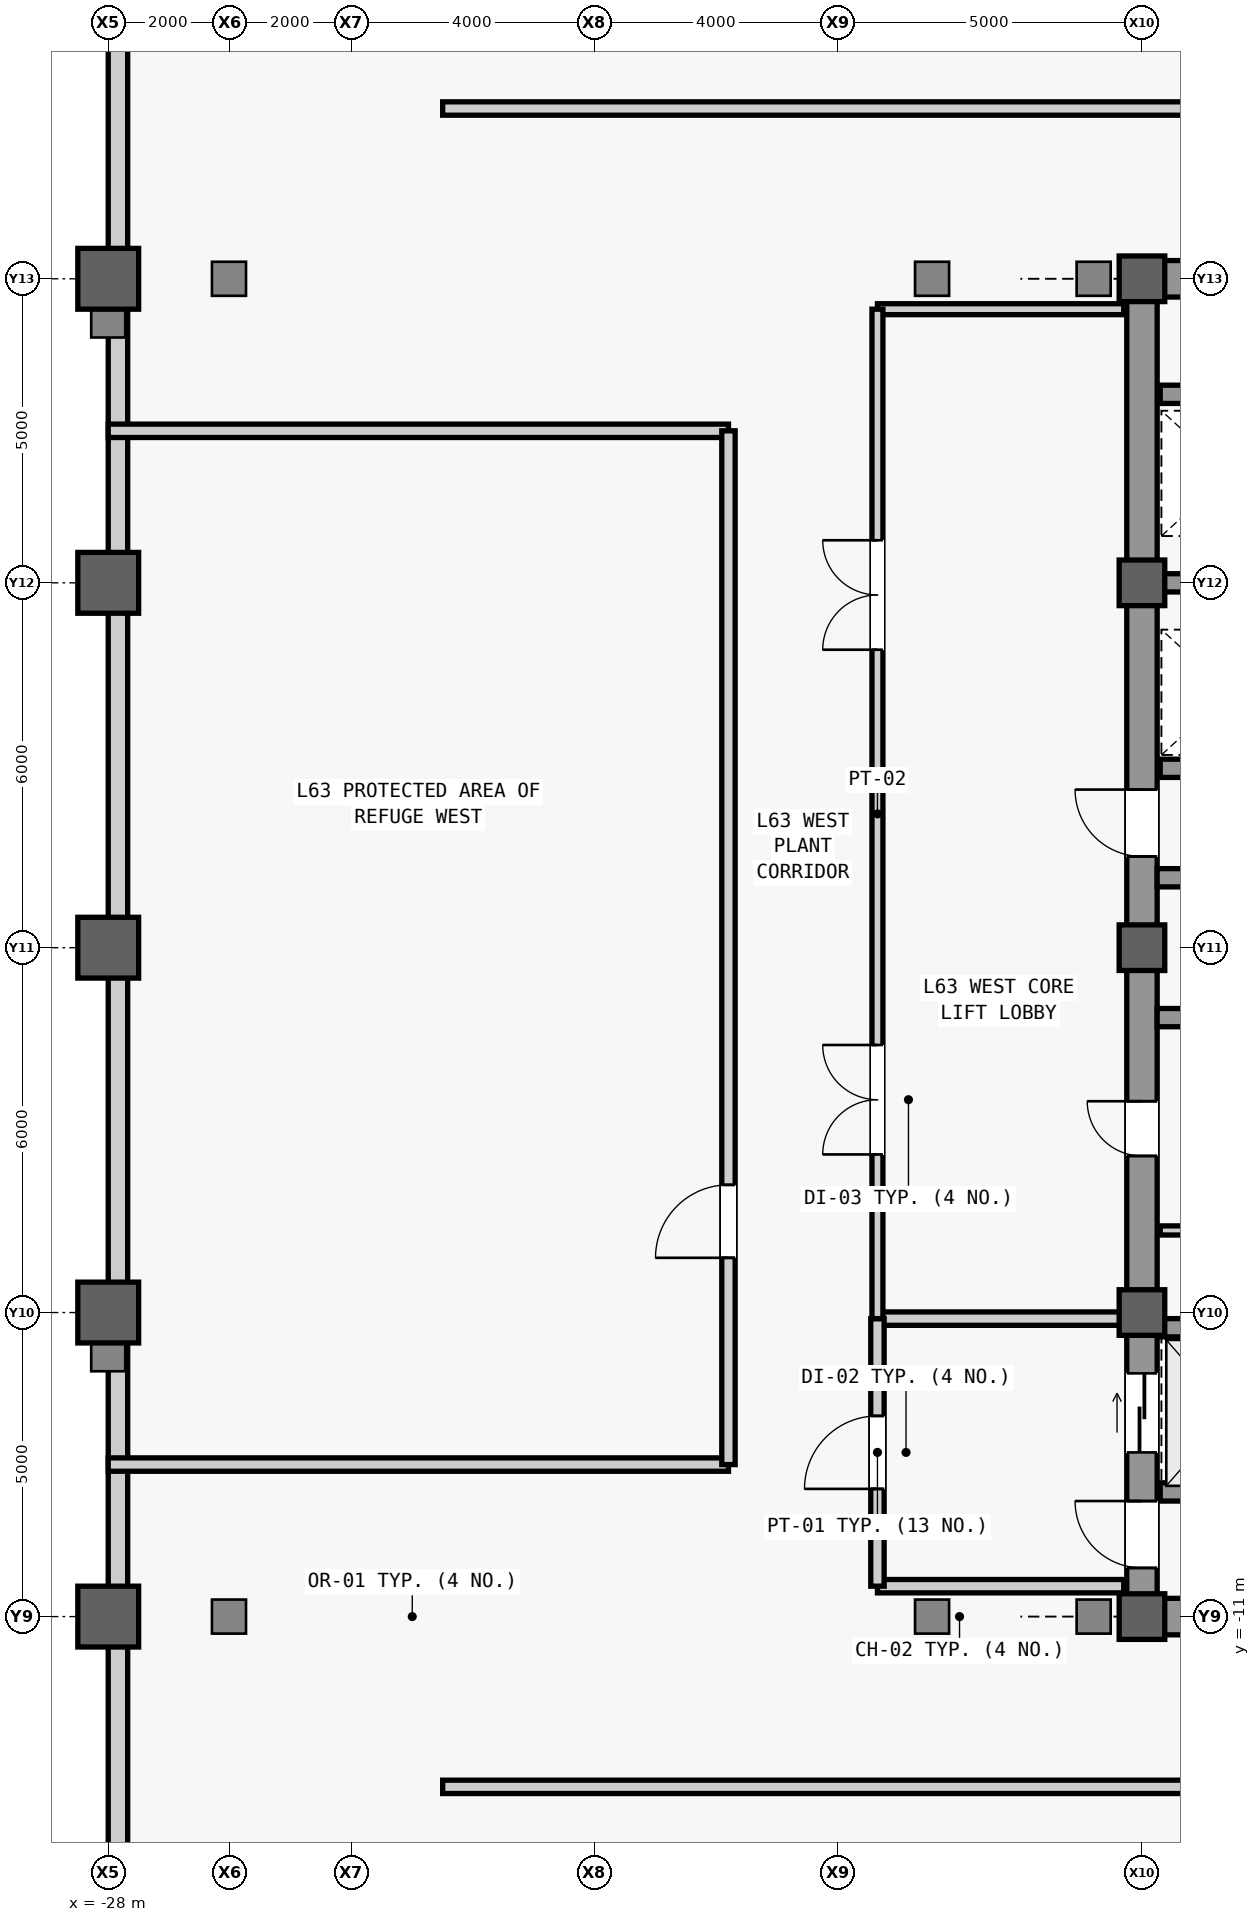
"""IFC4 building model, lengths in metres.
Left out: names, types, materials, properties, quantities, classifications, styles, units other than length and angle.
Written with IfcOpenShell. Run it as: python <this file> out.ifc"""

import sys

from ifc_helpers import new_model, si_unit, direction, frame, frame_2d, origin, origin_2d, place, context, subcontext, project, spatial, rectangle, hollow_rectangle, extrude, source, transform, mapped, element, fill, save


model = new_model("IFC4")
c1 = context("Model", 3, precision=1e-05, world=origin(), true_north=direction((0.0, 1.0)))
c2 = subcontext(c1, "Body", "Model", "MODEL_VIEW")
j1 = project(units=[si_unit("LENGTHUNIT", "METRE"), si_unit("PLANEANGLEUNIT", "RADIAN")], contexts=[c1])
p1 = place(None, origin())
s1 = spatial("IfcSite", under=j1, at=p1, CompositionType="ELEMENT")
p2 = place(p1, origin())
s2 = spatial("IfcBuilding", under=s1, at=p2, CompositionType="ELEMENT")
p3 = place(p2, frame((0.0, 0.0, 268.3)))
s3 = spatial("IfcBuildingStorey", under=s2, at=p3, CompositionType="ELEMENT", Elevation=268.3)
m1 = source(origin(), c2, "Body", "SweptSolid", [
    extrude(rectangle(XDim=22.0, YDim=0.5, at=frame_2d((11.0, 0.0))), origin(), (0.0, 0.0, 1.0), 4.98),
])
p4 = place(p3, frame((-11.0, -11.0, 0.0), z_axis=(0.0, 0.0, 1.0), x_axis=(0.0, 1.0, 0.0)))
e1 = element("IfcWall", 1, at=p4, inside=s3, PredefinedType="SHEAR", context=c2, shape_type="MappedRepresentation", body=[
    mapped(m1, transform((0.0, 0.0, 0.0), scale=1.0)),
])
m2 = source(origin(), c2, "Body", "SweptSolid", [
    extrude(rectangle(XDim=1.1, YDim=2.2, at=frame_2d((0.55, 1.1))), frame((0.0, 0.26, 0.0), z_axis=(0.0, -1.0, 0.0), x_axis=(1.0, 0.0, 0.0)), (0.0, 0.0, 1.0), 0.52),
])
p5 = place(p4, frame((0.8, 0.0, 0.0)))
e2 = element("IfcOpeningElement", 2, at=p5, cuts=e1, PredefinedType="OPENING", context=c2, shape_type="MappedRepresentation", body=[
    mapped(m2, transform((0.0, 0.0, 0.0), scale=1.0)),
])
p6 = place(p4, frame((12.5, 0.0, 0.0)))
e3 = element("IfcOpeningElement", 3, at=p6, cuts=e1, PredefinedType="OPENING", context=c2, shape_type="MappedRepresentation", body=[
    mapped(m2, transform((0.0, 0.0, 0.0), scale=1.0)),
])
m3 = source(origin(), c2, "Body", "SweptSolid", [
    extrude(rectangle(XDim=0.9, YDim=2.15, at=frame_2d((0.45, 1.075))), frame((0.0, 0.26, 0.0), z_axis=(0.0, -1.0, 0.0), x_axis=(1.0, 0.0, 0.0)), (0.0, 0.0, 1.0), 0.52),
])
p7 = place(p4, frame((7.575, 0.0, 0.0)))
e4 = element("IfcOpeningElement", 4, at=p7, cuts=e1, PredefinedType="OPENING", context=c2, shape_type="MappedRepresentation", body=[
    mapped(m3, transform((0.0, 0.0, 0.0), scale=1.0)),
])
m4 = source(origin(), c2, "Body", "SweptSolid", [
    extrude(rectangle(XDim=1.3, YDim=2.3, at=frame_2d((0.65, 1.15))), frame((0.0, 0.26, 0.0), z_axis=(0.0, -1.0, 0.0), x_axis=(1.0, 0.0, 0.0)), (0.0, 0.0, 1.0), 0.52),
])
p8 = place(p4, frame((2.7, 0.0, 0.0)))
e5 = element("IfcOpeningElement", 5, at=p8, cuts=e1, PredefinedType="OPENING", context=c2, shape_type="MappedRepresentation", body=[
    mapped(m4, transform((0.0, 0.0, 0.0), scale=1.0)),
])
m5 = source(origin(), c2, "Body", "SweptSolid", [
    extrude(rectangle(XDim=5.9, YDim=0.6, at=frame_2d((2.95, 0.0))), origin(), (0.0, 0.0, 1.0), 4.98),
])
for number, where, z_axis, x_axis in (
    (6, (-10.75, -11.0, 0.0), (0.0, 0.0, 1.0), (1.0, 0.0, 0.0)),
    (7, (-10.75, 11.0, 0.0), (0.0, 0.0, 1.0), (1.0, 0.0, 0.0)),
):
    element("IfcWall", number, at=place(p3, frame(where, z_axis=z_axis, x_axis=x_axis)), inside=s3, PredefinedType="SHEAR", context=c2, shape_type="MappedRepresentation", body=[
        mapped(m5, transform((0.0, 0.0, 0.0), scale=1.0)),
    ])
m6 = source(origin(), c2, "Body", "SweptSolid", [
    extrude(rectangle(XDim=5.65, YDim=0.3, at=frame_2d((2.825, 0.0))), origin(), (0.0, 0.0, 1.0), 4.98),
])
for number, where, z_axis, x_axis in (
    (8, (-10.75, -1.15, 0.0), (0.0, 0.0, 1.0), (1.0, 0.0, 0.0)),
    (9, (-10.75, 1.15, 0.0), (0.0, 0.0, 1.0), (1.0, 0.0, 0.0)),
):
    element("IfcWall", number, at=place(p3, frame(where, z_axis=z_axis, x_axis=x_axis)), inside=s3, PredefinedType="SHEAR", context=c2, shape_type="MappedRepresentation", body=[
        mapped(m6, transform((0.0, 0.0, 0.0), scale=1.0)),
    ])
m7 = source(origin(), c2, "Body", "SweptSolid", [
    extrude(hollow_rectangle(XDim=1.0, YDim=1.0, WallThickness=0.055, at=origin_2d()), origin(), (0.0, 0.0, 1.0), 5.2),
])
for number, where, z_axis, x_axis in (
    (10, (-28.0, -11.0, 0.0), (0.0, 0.0, 1.0), (1.0, 0.0, 0.0)),
    (11, (-28.0, -6.0, 0.0), (0.0, 0.0, 1.0), (1.0, 0.0, 0.0)),
    (12, (-28.0, 0.0, 0.0), (0.0, 0.0, 1.0), (1.0, 0.0, 0.0)),
    (13, (-28.0, 6.0, 0.0), (0.0, 0.0, 1.0), (1.0, 0.0, 0.0)),
    (14, (-28.0, 11.0, 0.0), (0.0, 0.0, 1.0), (1.0, 0.0, 0.0)),
):
    element("IfcColumn", number, at=place(p3, frame(where, z_axis=z_axis, x_axis=x_axis)), inside=s3, PredefinedType="COLUMN", context=c2, shape_type="MappedRepresentation", body=[
        mapped(m7, transform((0.0, 0.0, 0.0), scale=1.0)),
    ])
m8 = source(origin(), c2, "Body", "SweptSolid", [
    extrude(rectangle(XDim=0.75, YDim=0.75, at=origin_2d()), origin(), (0.0, 0.0, 1.0), 5.2),
])
for number, where, z_axis, x_axis in (
    (15, (-11.0, -11.0, 0.0), (0.0, 0.0, 1.0), (1.0, 0.0, 0.0)),
    (16, (-11.0, -6.0, 0.0), (0.0, 0.0, 1.0), (1.0, 0.0, 0.0)),
    (17, (-11.0, 0.0, 0.0), (0.0, 0.0, 1.0), (1.0, 0.0, 0.0)),
    (18, (-11.0, 6.0, 0.0), (0.0, 0.0, 1.0), (1.0, 0.0, 0.0)),
    (19, (-11.0, 11.0, 0.0), (0.0, 0.0, 1.0), (1.0, 0.0, 0.0)),
):
    element("IfcColumn", number, at=place(p3, frame(where, z_axis=z_axis, x_axis=x_axis)), inside=s3, PredefinedType="COLUMN", context=c2, shape_type="MappedRepresentation", body=[
        mapped(m8, transform((0.0, 0.0, 0.0), scale=1.0)),
    ])
m9 = source(origin(), c2, "Body", "SweptSolid", [
    extrude(rectangle(XDim=45.0, YDim=0.32, at=frame_2d((22.5, 0.0))), origin(), (0.0, 0.0, 1.0), 4.364),
])
p9 = place(p3, frame((-27.84, -22.5, 0.0), z_axis=(0.0, 0.0, 1.0), x_axis=(0.0, 1.0, 0.0)))
e20 = element("IfcWall", 20, at=p9, inside=s3, PredefinedType="STANDARD", context=c2, shape_type="MappedRepresentation", body=[
    mapped(m9, transform((0.0, 0.0, 0.0), scale=1.0)),
])
m10 = source(origin(), c2, "Body", "SweptSolid", [
    extrude(rectangle(XDim=2.2, YDim=0.3, at=frame_2d((1.1, 0.0))), origin(), (0.0, 0.0, 1.0), 4.98),
])
for number, where, z_axis, x_axis in (
    (21, (-10.7, -8.95, 0.0), (0.0, 0.0, 1.0), (1.0, 0.0, 0.0)),
    (22, (-10.7, -6.25, 0.0), (0.0, 0.0, 1.0), (1.0, 0.0, 0.0)),
    (23, (-10.7, 2.95, 0.0), (0.0, 0.0, 1.0), (1.0, 0.0, 0.0)),
    (24, (-10.7, 6.0, 0.0), (0.0, 0.0, 1.0), (1.0, 0.0, 0.0)),
    (25, (-10.7, 9.1, 0.0), (0.0, 0.0, 1.0), (1.0, 0.0, 0.0)),
):
    element("IfcWall", number, at=place(p3, frame(where, z_axis=z_axis, x_axis=x_axis)), inside=s3, PredefinedType="SHEAR", context=c2, shape_type="MappedRepresentation", body=[
        mapped(m10, transform((0.0, 0.0, 0.0), scale=1.0)),
    ])
m11 = source(origin(), c2, "Body", "SweptSolid", [
    extrude(rectangle(XDim=2.05, YDim=0.15, at=frame_2d((1.025, 0.0))), origin(), (0.0, 0.0, 1.0), 4.98),
])
p10 = place(p3, frame((-10.7, -4.65, 0.0), z_axis=(0.0, 0.0, 1.0), x_axis=(1.0, 0.0, 0.0)))
e26 = element("IfcWall", 26, at=p10, inside=s3, PredefinedType="PARTITIONING", context=c2, shape_type="MappedRepresentation", body=[
    mapped(m11, transform((0.0, 0.0, 0.0), scale=1.0)),
])
m12 = source(origin(), c2, "Body", "SweptSolid", [
    extrude(rectangle(XDim=4.05, YDim=0.22, at=frame_2d((2.025, 0.0))), origin(), (0.0, 0.0, 1.0), 4.98),
])
p11 = place(p3, frame((-15.35, -10.5, 0.0), z_axis=(0.0, 0.0, 1.0), x_axis=(1.0, 0.0, 0.0)))
e27 = element("IfcWall", 27, at=p11, inside=s3, PredefinedType="PARTITIONING", context=c2, shape_type="MappedRepresentation", body=[
    mapped(m12, transform((0.0, 0.0, 0.0), scale=1.0)),
])
m13 = source(origin(), c2, "Body", "SweptSolid", [
    extrude(rectangle(XDim=4.05, YDim=0.22, at=frame_2d((2.025, 0.0))), origin(), (0.0, 0.0, 1.0), 4.285),
])
p12 = place(p3, frame((-15.35, -6.1, 0.0), z_axis=(0.0, 0.0, 1.0), x_axis=(1.0, 0.0, 0.0)))
e28 = element("IfcWall", 28, at=p12, inside=s3, PredefinedType="PARTITIONING", context=c2, shape_type="MappedRepresentation", body=[
    mapped(m13, transform((0.0, 0.0, 0.0), scale=1.0)),
])
m14 = source(origin(), c2, "Body", "SweptSolid", [
    extrude(rectangle(XDim=4.4, YDim=0.22, at=frame_2d((2.2, 0.0))), origin(), (0.0, 0.0, 1.0), 4.98),
])
p13 = place(p3, frame((-15.35, -10.5, 0.0), z_axis=(0.0, 0.0, 1.0), x_axis=(0.0, 1.0, 0.0)))
e29 = element("IfcWall", 29, at=p13, inside=s3, PredefinedType="PARTITIONING", context=c2, shape_type="MappedRepresentation", body=[
    mapped(m14, transform((0.0, 0.0, 0.0), scale=1.0)),
])
m15 = source(origin(), c2, "Body", "SweptSolid", [
    extrude(rectangle(XDim=1.2, YDim=2.2, at=frame_2d((0.6, 1.1))), frame((0.0, 0.12, 0.0), z_axis=(0.0, -1.0, 0.0), x_axis=(1.0, 0.0, 0.0)), (0.0, 0.0, 1.0), 0.24),
])
p14 = place(p13, frame((1.6, 0.0, 0.0)))
e30 = element("IfcOpeningElement", 30, at=p14, cuts=e29, PredefinedType="OPENING", context=c2, shape_type="MappedRepresentation", body=[
    mapped(m15, transform((0.0, 0.0, 0.0), scale=1.0)),
])
m16 = source(origin(), c2, "Body", "SweptSolid", [
    extrude(rectangle(XDim=4.05, YDim=0.18, at=frame_2d((2.025, 0.0))), origin(), (0.0, 0.0, 1.0), 4.98),
])
p15 = place(p3, frame((-15.35, 10.5, 0.0), z_axis=(0.0, 0.0, 1.0), x_axis=(1.0, 0.0, 0.0)))
e31 = element("IfcWall", 31, at=p15, inside=s3, PredefinedType="PARTITIONING", context=c2, shape_type="MappedRepresentation", body=[
    mapped(m16, transform((0.0, 0.0, 0.0), scale=1.0)),
])
m17 = source(origin(), c2, "Body", "SweptSolid", [
    extrude(rectangle(XDim=16.6, YDim=0.18, at=frame_2d((8.3, 0.0))), origin(), (0.0, 0.0, 1.0), 4.98),
])
p16 = place(p3, frame((-15.35, -6.1, 0.0), z_axis=(0.0, 0.0, 1.0), x_axis=(0.0, 1.0, 0.0)))
e32 = element("IfcWall", 32, at=p16, inside=s3, PredefinedType="PARTITIONING", context=c2, shape_type="MappedRepresentation", body=[
    mapped(m17, transform((0.0, 0.0, 0.0), scale=1.0)),
])
m18 = source(origin(), c2, "Body", "SweptSolid", [
    extrude(rectangle(XDim=1.8, YDim=2.25, at=frame_2d((0.9, 1.125))), frame((0.0, 0.1, 0.0), z_axis=(0.0, -1.0, 0.0), x_axis=(1.0, 0.0, 0.0)), (0.0, 0.0, 1.0), 0.2),
])
p17 = place(p16, frame((2.7, 0.0, 0.0)))
e33 = element("IfcOpeningElement", 33, at=p17, cuts=e32, PredefinedType="OPENING", context=c2, shape_type="MappedRepresentation", body=[
    mapped(m18, transform((0.0, 0.0, 0.0), scale=1.0)),
])
p18 = place(p16, frame((11.0, 0.0, 0.0)))
e34 = element("IfcOpeningElement", 34, at=p18, cuts=e32, PredefinedType="OPENING", context=c2, shape_type="MappedRepresentation", body=[
    mapped(m18, transform((0.0, 0.0, 0.0), scale=1.0)),
])
m19 = source(origin(), c2, "Body", "SweptSolid", [
    extrude(rectangle(XDim=45.0, YDim=0.22, at=frame_2d((22.5, 0.0))), origin(), (0.0, 0.0, 1.0), 4.98),
])
p19 = place(p3, frame((-22.5, -13.8, 0.0), z_axis=(0.0, 0.0, 1.0), x_axis=(1.0, 0.0, 0.0)))
e35 = element("IfcWall", 35, at=p19, inside=s3, PredefinedType="PARTITIONING", context=c2, shape_type="MappedRepresentation", body=[
    mapped(m19, transform((0.0, 0.0, 0.0), scale=1.0)),
])
m20 = source(origin(), c2, "Body", "SweptSolid", [
    extrude(rectangle(XDim=1.5, YDim=2.3, at=frame_2d((0.75, 1.15))), frame((0.0, 0.12, 0.0), z_axis=(0.0, -1.0, 0.0), x_axis=(1.0, 0.0, 0.0)), (0.0, 0.0, 1.0), 0.24),
])
p20 = place(p19, frame((16.6, 0.0, 0.0)))
e36 = element("IfcOpeningElement", 36, at=p20, cuts=e35, PredefinedType="OPENING", context=c2, shape_type="MappedRepresentation", body=[
    mapped(m20, transform((0.0, 0.0, 0.0), scale=1.0)),
])
p21 = place(p19, frame((29.6, 0.0, 0.0)))
e37 = element("IfcOpeningElement", 37, at=p21, cuts=e35, PredefinedType="OPENING", context=c2, shape_type="MappedRepresentation", body=[
    mapped(m20, transform((0.0, 0.0, 0.0), scale=1.0)),
])
p22 = place(p3, frame((-22.5, 13.8, 0.0), z_axis=(0.0, 0.0, 1.0), x_axis=(1.0, 0.0, 0.0)))
e38 = element("IfcWall", 38, at=p22, inside=s3, PredefinedType="PARTITIONING", context=c2, shape_type="MappedRepresentation", body=[
    mapped(m19, transform((0.0, 0.0, 0.0), scale=1.0)),
])
p23 = place(p22, frame((13.8, 0.0, 0.0)))
e39 = element("IfcOpeningElement", 39, at=p23, cuts=e38, PredefinedType="OPENING", context=c2, shape_type="MappedRepresentation", body=[
    mapped(m20, transform((0.0, 0.0, 0.0), scale=1.0)),
])
p24 = place(p22, frame((23.35, 0.0, 0.0)))
e40 = element("IfcOpeningElement", 40, at=p24, cuts=e38, PredefinedType="OPENING", context=c2, shape_type="MappedRepresentation", body=[
    mapped(m20, transform((0.0, 0.0, 0.0), scale=1.0)),
])
p25 = place(p22, frame((31.95, 0.0, 0.0)))
e41 = element("IfcOpeningElement", 41, at=p25, cuts=e38, PredefinedType="OPENING", context=c2, shape_type="MappedRepresentation", body=[
    mapped(m20, transform((0.0, 0.0, 0.0), scale=1.0)),
])
m21 = source(origin(), c2, "Body", "SweptSolid", [
    extrude(rectangle(XDim=10.2, YDim=0.22, at=frame_2d((5.1, 0.0))), origin(), (0.0, 0.0, 1.0), 4.98),
])
for number, where, z_axis, x_axis in (
    (42, (-28.0, -8.5, 0.0), (0.0, 0.0, 1.0), (1.0, 0.0, 0.0)),
    (43, (-28.0, 8.5, 0.0), (0.0, 0.0, 1.0), (1.0, 0.0, 0.0)),
):
    element("IfcWall", number, at=place(p3, frame(where, z_axis=z_axis, x_axis=x_axis)), inside=s3, PredefinedType="PARTITIONING", context=c2, shape_type="MappedRepresentation", body=[
        mapped(m21, transform((0.0, 0.0, 0.0), scale=1.0)),
    ])
m22 = source(origin(), c2, "Body", "SweptSolid", [
    extrude(rectangle(XDim=17.0, YDim=0.22, at=frame_2d((8.5, 0.0))), origin(), (0.0, 0.0, 1.0), 4.98),
])
p26 = place(p3, frame((-17.8, -8.5, 0.0), z_axis=(0.0, 0.0, 1.0), x_axis=(0.0, 1.0, 0.0)))
e44 = element("IfcWall", 44, at=p26, inside=s3, PredefinedType="PARTITIONING", context=c2, shape_type="MappedRepresentation", body=[
    mapped(m22, transform((0.0, 0.0, 0.0), scale=1.0)),
])
p27 = place(p26, frame((3.4, 0.0, 0.0)))
e45 = element("IfcOpeningElement", 45, at=p27, cuts=e44, PredefinedType="OPENING", context=c2, shape_type="MappedRepresentation", body=[
    mapped(m15, transform((0.0, 0.0, 0.0), scale=1.0)),
])
m23 = source(origin(), c2, "Body", "SweptSolid", [
    extrude(rectangle(XDim=1.1, YDim=2.2, at=frame_2d((0.55, 1.1))), frame((0.0, 0.025, 0.0), z_axis=(0.0, -1.0, 0.0), x_axis=(1.0, 0.0, 0.0)), (0.0, 0.0, 1.0), 0.05),
])
p28 = place(p5, origin())
e46 = element("IfcDoor", 46, at=p28, inside=s3, OperationType="SINGLE_SWING_RIGHT", PredefinedType="DOOR", context=c2, shape_type="MappedRepresentation", body=[
    mapped(m23, transform((0.0, 0.0, 0.0), scale=1.0)),
])
fill(e2, e46)
p29 = place(p6, origin())
e47 = element("IfcDoor", 47, at=p29, inside=s3, OperationType="SINGLE_SWING_RIGHT", PredefinedType="DOOR", context=c2, shape_type="MappedRepresentation", body=[
    mapped(m23, transform((0.0, 0.0, 0.0), scale=1.0)),
])
fill(e3, e47)
m24 = source(origin(), c2, "Body", "SweptSolid", [
    extrude(rectangle(XDim=0.9, YDim=2.15, at=frame_2d((0.45, 1.075))), frame((0.0, 0.025, 0.0), z_axis=(0.0, -1.0, 0.0), x_axis=(1.0, 0.0, 0.0)), (0.0, 0.0, 1.0), 0.05),
])
p30 = place(p7, origin())
e48 = element("IfcDoor", 48, at=p30, inside=s3, OperationType="SINGLE_SWING_RIGHT", PredefinedType="DOOR", context=c2, shape_type="MappedRepresentation", body=[
    mapped(m24, transform((0.0, 0.0, 0.0), scale=1.0)),
])
fill(e4, e48)
m25 = source(origin(), c2, "Body", "SweptSolid", [
    extrude(rectangle(XDim=1.2, YDim=2.2, at=frame_2d((0.6, 1.1))), frame((0.0, 0.025, 0.0), z_axis=(0.0, -1.0, 0.0), x_axis=(1.0, 0.0, 0.0)), (0.0, 0.0, 1.0), 0.05),
])
p31 = place(p14, origin())
e49 = element("IfcDoor", 49, at=p31, inside=s3, OperationType="SINGLE_SWING_LEFT", PredefinedType="DOOR", context=c2, shape_type="MappedRepresentation", body=[
    mapped(m25, transform((0.0, 0.0, 0.0), scale=1.0)),
])
fill(e30, e49)
m26 = source(origin(), c2, "Body", "SweptSolid", [
    extrude(rectangle(XDim=1.8, YDim=2.25, at=frame_2d((0.9, 1.125))), frame((0.0, 0.025, 0.0), z_axis=(0.0, -1.0, 0.0), x_axis=(1.0, 0.0, 0.0)), (0.0, 0.0, 1.0), 0.05),
])
p32 = place(p17, origin())
e50 = element("IfcDoor", 50, at=p32, inside=s3, OperationType="SINGLE_SWING_LEFT", PredefinedType="DOOR", context=c2, shape_type="MappedRepresentation", body=[
    mapped(m26, transform((0.0, 0.0, 0.0), scale=1.0)),
])
fill(e33, e50)
p33 = place(p18, origin())
e51 = element("IfcDoor", 51, at=p33, inside=s3, OperationType="SINGLE_SWING_RIGHT", PredefinedType="DOOR", context=c2, shape_type="MappedRepresentation", body=[
    mapped(m26, transform((0.0, 0.0, 0.0), scale=1.0)),
])
fill(e34, e51)
p34 = place(p27, origin())
e52 = element("IfcDoor", 52, at=p34, inside=s3, OperationType="SINGLE_SWING_LEFT", PredefinedType="DOOR", context=c2, shape_type="MappedRepresentation", body=[
    mapped(m25, transform((0.0, 0.0, 0.0), scale=1.0)),
])
fill(e45, e52)
m27 = source(origin(), c2, "Body", "SweptSolid", [
    extrude(rectangle(XDim=1.3, YDim=2.3, at=frame_2d((0.65, 1.15))), frame((0.0, 0.025, 0.0), z_axis=(0.0, -1.0, 0.0), x_axis=(1.0, 0.0, 0.0)), (0.0, 0.0, 1.0), 0.05),
])
p35 = place(p8, origin())
e53 = element("IfcDoor", 53, at=p35, inside=s3, OperationType="SLIDING_TO_LEFT", PredefinedType="DOOR", context=c2, shape_type="MappedRepresentation", body=[
    mapped(m27, transform((0.0, 0.0, 0.0), scale=1.0)),
])
fill(e5, e53)
save(model, sys.argv[1])
